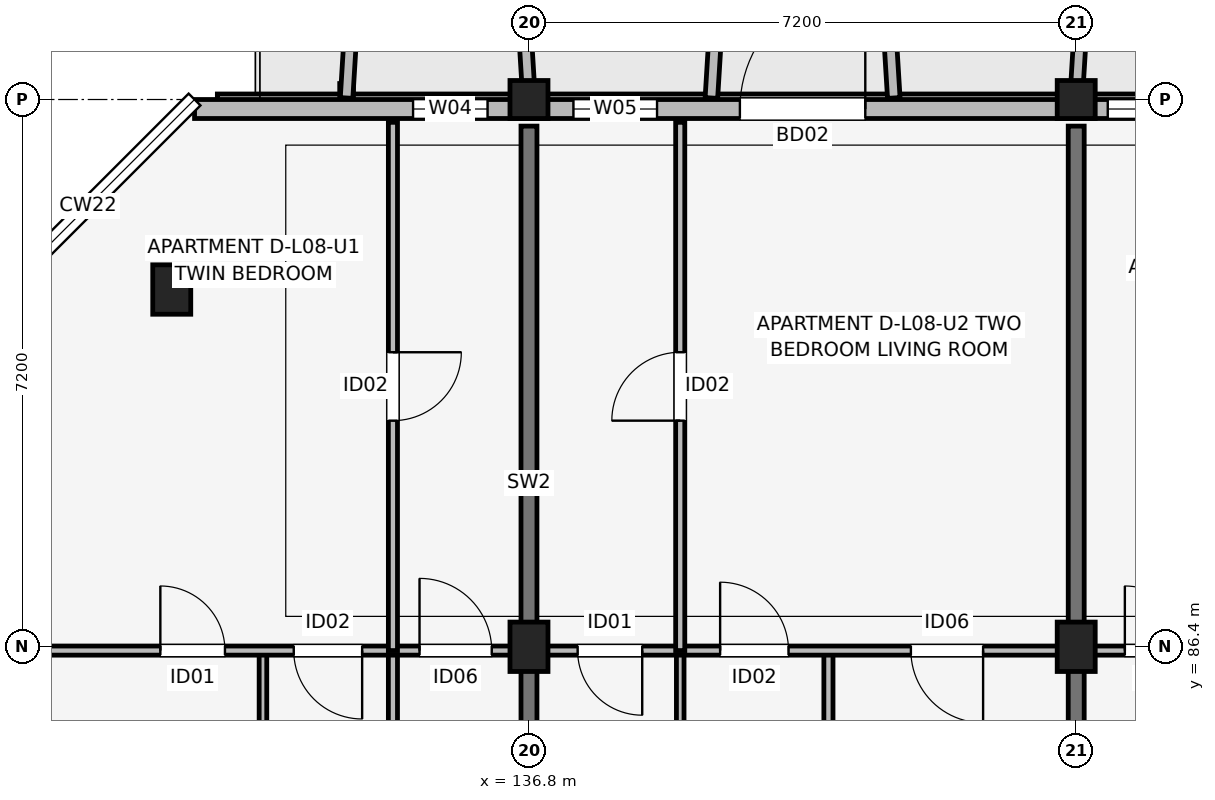
"""IFC4 building model, lengths in metres.
Left out: names, types, materials, properties, quantities, classifications, styles, units other than length and angle.
Written with IfcOpenShell. Run it as: python <this file> out.ifc"""

import sys

from ifc_helpers import new_model, si_unit, direction, frame, frame_2d, origin, origin_2d, place, context, subcontext, project, spatial, rectangle, extrude, element, fill, save


model = new_model("IFC4")
c1 = context("Model", 3, precision=1e-05, world=origin(), true_north=direction((0.0, 1.0)))
c2 = subcontext(c1, "Body", "Model", "MODEL_VIEW")
j1 = project(units=[si_unit("LENGTHUNIT", "METRE"), si_unit("PLANEANGLEUNIT", "RADIAN")], contexts=[c1])
p1 = place(None, origin())
s1 = spatial("IfcSite", under=j1, at=p1, CompositionType="ELEMENT")
p2 = place(p1, origin())
s2 = spatial("IfcBuilding", under=s1, at=p2, CompositionType="ELEMENT")
p3 = place(p2, frame((0.0, 0.0, 27.6)))
s3 = spatial("IfcBuildingStorey", under=s2, at=p3, CompositionType="ELEMENT", Elevation=27.6)
for number, where, z_axis, x_axis in (
    (1, (132.1, 91.1, 0.0), (0.0, 0.0, 1.0), (1.0, 0.0, 0.0)),
    (2, (136.8, 86.4, 0.0), (0.0, 0.0, 1.0), (1.0, 0.0, 0.0)),
):
    element("IfcColumn", number, at=place(p3, frame(where, z_axis=z_axis, x_axis=x_axis)), inside=s3, PredefinedType="COLUMN", context=c2, shape_type="SweptSolid", body=[
        extrude(rectangle(XDim=0.5, YDim=0.65, at=origin_2d()), origin(), (0.0, 0.0, 1.0), 3.15),
    ])
p4 = place(p3, frame((136.8, 93.6, 0.0), z_axis=(0.0, 0.0, 1.0), x_axis=(1.0, 0.0, 0.0)))
e3 = element("IfcColumn", 3, at=p4, inside=s3, PredefinedType="COLUMN", context=c2, shape_type="SweptSolid", body=[
    extrude(rectangle(XDim=0.5, YDim=0.5, at=origin_2d()), origin(), (0.0, 0.0, 1.0), 3.15),
])
p5 = place(p3, frame((144.0, 86.4, 0.0), z_axis=(0.0, 0.0, 1.0), x_axis=(1.0, 0.0, 0.0)))
e4 = element("IfcColumn", 4, at=p5, inside=s3, PredefinedType="COLUMN", context=c2, shape_type="SweptSolid", body=[
    extrude(rectangle(XDim=0.5, YDim=0.65, at=origin_2d()), origin(), (0.0, 0.0, 1.0), 3.15),
])
p6 = place(p3, frame((144.0, 93.6, 0.0), z_axis=(0.0, 0.0, 1.0), x_axis=(1.0, 0.0, 0.0)))
e5 = element("IfcColumn", 5, at=p6, inside=s3, PredefinedType="COLUMN", context=c2, shape_type="SweptSolid", body=[
    extrude(rectangle(XDim=0.5, YDim=0.5, at=origin_2d()), origin(), (0.0, 0.0, 1.0), 3.15),
])
for number, where, z_axis, x_axis in (
    (6, (136.8, 83.85, 0.0), (0.0, 0.0, 1.0), (0.0, 1.0, 0.0)),
    (7, (144.0, 83.85, 0.0), (0.0, 0.0, 1.0), (0.0, 1.0, 0.0)),
):
    element("IfcWall", number, at=place(p3, frame(where, z_axis=z_axis, x_axis=x_axis)), inside=s3, PredefinedType="SHEAR", context=c2, shape_type="SweptSolid", body=[
        extrude(rectangle(XDim=9.4, YDim=0.21, at=frame_2d((4.7, 0.0))), origin(), (0.0, 0.0, 1.0), 3.15),
    ])
p7 = place(p3, frame((162.8, 93.475, 0.0), z_axis=(0.0, 0.0, 1.0), x_axis=(-1.0, 0.0, 0.0)))
e8 = element("IfcWall", 8, at=p7, inside=s3, PredefinedType="SOLIDWALL", context=c2, shape_type="SweptSolid", body=[
    extrude(rectangle(XDim=30.4, YDim=0.25, at=frame_2d((15.2, 0.0))), origin(), (0.0, 0.0, 1.0), 2.43),
])
p8 = place(p7, frame((23.225, 0.0, 0.0), z_axis=(0.0, 0.0, 1.0), x_axis=(-1.0, 0.0, 0.0)))
e9 = element("IfcOpeningElement", 9, at=p8, cuts=e8, PredefinedType="OPENING", context=c2, shape_type="SweptSolid", body=[
    extrude(rectangle(XDim=1.65, YDim=2.15, at=frame_2d((0.825, 1.075))), frame((0.0, 0.135, 0.0), z_axis=(0.0, -1.0, 0.0), x_axis=(1.0, 0.0, 0.0)), (0.0, 0.0, 1.0), 0.27),
])
p9 = place(p7, frame((8.75, 0.0, 0.0), z_axis=(0.0, 0.0, 1.0), x_axis=(-1.0, 0.0, 0.0)))
e10 = element("IfcOpeningElement", 10, at=p9, cuts=e8, PredefinedType="OPENING", context=c2, shape_type="SweptSolid", body=[
    extrude(rectangle(XDim=1.5, YDim=2.15, at=frame_2d((0.75, 1.075))), frame((0.0, 0.135, 0.0), z_axis=(0.0, -1.0, 0.0), x_axis=(1.0, 0.0, 0.0)), (0.0, 0.0, 1.0), 0.27),
])
p10 = place(p7, frame((26.545, 0.0, 0.75)))
e11 = element("IfcOpeningElement", 11, at=p10, cuts=e8, PredefinedType="OPENING", context=c2, shape_type="SweptSolid", body=[
    extrude(rectangle(XDim=0.98, YDim=1.45, at=frame_2d((0.49, 0.725))), frame((0.0, 0.135, 0.0), z_axis=(0.0, -1.0, 0.0), x_axis=(1.0, 0.0, 0.0)), (0.0, 0.0, 1.0), 0.27),
])
p11 = place(p7, frame((24.315, 0.0, 0.75)))
e12 = element("IfcOpeningElement", 12, at=p11, cuts=e8, PredefinedType="OPENING", context=c2, shape_type="SweptSolid", body=[
    extrude(rectangle(XDim=1.1, YDim=1.5, at=frame_2d((0.55, 0.75))), frame((0.0, 0.135, 0.0), z_axis=(0.0, -1.0, 0.0), x_axis=(1.0, 0.0, 0.0)), (0.0, 0.0, 1.0), 0.27),
])
p12 = place(p7, frame((16.525, 0.0, 0.7)))
e13 = element("IfcOpeningElement", 13, at=p12, cuts=e8, PredefinedType="OPENING", context=c2, shape_type="SweptSolid", body=[
    extrude(rectangle(XDim=1.86, YDim=1.6, at=frame_2d((0.93, 0.8))), frame((0.0, 0.135, 0.0), z_axis=(0.0, -1.0, 0.0), x_axis=(1.0, 0.0, 0.0)), (0.0, 0.0, 1.0), 0.27),
])
p13 = place(p7, frame((12.275, 0.0, 0.75)))
e14 = element("IfcOpeningElement", 14, at=p13, cuts=e8, PredefinedType="OPENING", context=c2, shape_type="SweptSolid", body=[
    extrude(rectangle(XDim=1.34, YDim=1.55, at=frame_2d((0.67, 0.775))), frame((0.0, 0.135, 0.0), z_axis=(0.0, -1.0, 0.0), x_axis=(1.0, 0.0, 0.0)), (0.0, 0.0, 1.0), 0.27),
])
p14 = place(p7, frame((9.61, 0.0, 0.75)))
e15 = element("IfcOpeningElement", 15, at=p14, cuts=e8, PredefinedType="OPENING", context=c2, shape_type="SweptSolid", body=[
    extrude(rectangle(XDim=1.46, YDim=1.55, at=frame_2d((0.73, 0.775))), frame((0.0, 0.135, 0.0), z_axis=(0.0, -1.0, 0.0), x_axis=(1.0, 0.0, 0.0)), (0.0, 0.0, 1.0), 0.27),
])
p15 = place(p7, frame((2.935, 0.0, 0.75)))
e16 = element("IfcOpeningElement", 16, at=p15, cuts=e8, PredefinedType="OPENING", context=c2, shape_type="SweptSolid", body=[
    extrude(rectangle(XDim=0.6, YDim=1.25, at=frame_2d((0.3, 0.625))), frame((0.0, 0.135, 0.0), z_axis=(0.0, -1.0, 0.0), x_axis=(1.0, 0.0, 0.0)), (0.0, 0.0, 1.0), 0.27),
])
p16 = place(p7, frame((0.725, 0.0, 0.75)))
e17 = element("IfcOpeningElement", 17, at=p16, cuts=e8, PredefinedType="OPENING", context=c2, shape_type="SweptSolid", body=[
    extrude(rectangle(XDim=0.72, YDim=1.35, at=frame_2d((0.36, 0.675))), frame((0.0, 0.135, 0.0), z_axis=(0.0, -1.0, 0.0), x_axis=(1.0, 0.0, 0.0)), (0.0, 0.0, 1.0), 0.27),
])
for number, where, z_axis, x_axis in (
    (18, (134.4, 93.62, 0.0), (0.0, 0.0, 1.0), (0.061, 0.998, 0.0)),
    (19, (136.8, 93.62, 0.0), (0.0, 0.0, 1.0), (-0.061, 0.998, 0.0)),
):
    element("IfcWall", number, at=place(p3, frame(where, z_axis=z_axis, x_axis=x_axis)), inside=s3, PredefinedType="ELEMENTEDWALL", context=c2, shape_type="SweptSolid", body=[
        extrude(rectangle(XDim=1.964, YDim=0.165, at=frame_2d((0.982, 0.0))), origin(), (0.0, 0.0, 1.0), 2.95),
    ])
for number, where, z_axis, x_axis in (
    (20, (139.2, 93.62, 0.0), (0.0, 0.0, 1.0), (0.061, 0.998, 0.0)),
    (21, (141.6, 93.62, 0.0), (0.0, 0.0, 1.0), (-0.061, 0.998, 0.0)),
):
    element("IfcWall", number, at=place(p3, frame(where, z_axis=z_axis, x_axis=x_axis)), inside=s3, PredefinedType="ELEMENTEDWALL", context=c2, shape_type="SweptSolid", body=[
        extrude(rectangle(XDim=1.964, YDim=0.165, at=frame_2d((0.982, 0.0))), origin(), (0.0, 0.0, 1.0), 2.53),
    ])
p17 = place(p3, frame((144.0, 93.62, 0.0), z_axis=(0.0, 0.0, 1.0), x_axis=(0.061170732449, 0.998127317276, 0.0)))
e22 = element("IfcWall", 22, at=p17, inside=s3, PredefinedType="ELEMENTEDWALL", context=c2, shape_type="SweptSolid", body=[
    extrude(rectangle(XDim=1.964, YDim=0.165, at=frame_2d((0.982, 0.0))), origin(), (0.0, 0.0, 1.0), 2.95),
])
p18 = place(p3, frame((133.3, 83.7, 0.0), z_axis=(0.0, 0.0, 1.0), x_axis=(0.0, 1.0, 0.0)))
e23 = element("IfcWall", 23, at=p18, inside=s3, PredefinedType="PARTITIONING", context=c2, shape_type="SweptSolid", body=[
    extrude(rectangle(XDim=2.65, YDim=0.1, at=frame_2d((1.325, 0.0))), origin(), (0.0, 0.0, 1.0), 2.38),
])
p19 = place(p3, frame((135.01, 83.7, 0.0), z_axis=(0.0, 0.0, 1.0), x_axis=(0.0, 1.0, 0.0)))
e24 = element("IfcWall", 24, at=p19, inside=s3, PredefinedType="PARTITIONING", context=c2, shape_type="SweptSolid", body=[
    extrude(rectangle(XDim=2.65, YDim=0.12, at=frame_2d((1.325, 0.0))), origin(), (0.0, 0.0, 1.0), 2.38),
])
p20 = place(p3, frame((129.74, 86.35, 0.0), z_axis=(0.0, 0.0, 1.0), x_axis=(1.0, 0.0, 0.0)))
e25 = element("IfcWall", 25, at=p20, inside=s3, PredefinedType="PARTITIONING", context=c2, shape_type="SweptSolid", body=[
    extrude(rectangle(XDim=6.92, YDim=0.12, at=frame_2d((3.46, 0.0))), origin(), (0.0, 0.0, 1.0), 2.38),
])
p21 = place(p20, frame((2.21, 0.0, 0.0)))
e26 = element("IfcOpeningElement", 26, at=p21, cuts=e25, PredefinedType="OPENING", context=c2, shape_type="SweptSolid", body=[
    extrude(rectangle(XDim=0.85, YDim=2.08, at=frame_2d((0.425, 1.04))), frame((0.0, 0.07, 0.0), z_axis=(0.0, -1.0, 0.0), x_axis=(1.0, 0.0, 0.0)), (0.0, 0.0, 1.0), 0.14),
])
p22 = place(p20, frame((4.865, 0.0, 0.0), z_axis=(0.0, 0.0, 1.0), x_axis=(-1.0, 0.0, 0.0)))
e27 = element("IfcOpeningElement", 27, at=p22, cuts=e25, PredefinedType="OPENING", context=c2, shape_type="SweptSolid", body=[
    extrude(rectangle(XDim=0.9, YDim=2.08, at=frame_2d((0.45, 1.04))), frame((0.0, 0.07, 0.0), z_axis=(0.0, -1.0, 0.0), x_axis=(1.0, 0.0, 0.0)), (0.0, 0.0, 1.0), 0.14),
])
p23 = place(p20, frame((5.62, 0.0, 0.0)))
e28 = element("IfcOpeningElement", 28, at=p23, cuts=e25, PredefinedType="OPENING", context=c2, shape_type="SweptSolid", body=[
    extrude(rectangle(XDim=0.95, YDim=2.08, at=frame_2d((0.475, 1.04))), frame((0.0, 0.07, 0.0), z_axis=(0.0, -1.0, 0.0), x_axis=(1.0, 0.0, 0.0)), (0.0, 0.0, 1.0), 0.14),
])
p24 = place(p3, frame((135.01, 86.35, 0.0), z_axis=(0.0, 0.0, 1.0), x_axis=(0.0, 1.0, 0.0)))
e29 = element("IfcWall", 29, at=p24, inside=s3, PredefinedType="PARTITIONING", context=c2, shape_type="SweptSolid", body=[
    extrude(rectangle(XDim=6.95, YDim=0.12, at=frame_2d((3.475, 0.0))), origin(), (0.0, 0.0, 1.0), 2.38),
])
p25 = place(p24, frame((3.925, 0.0, 0.0), z_axis=(0.0, 0.0, 1.0), x_axis=(-1.0, 0.0, 0.0)))
e30 = element("IfcOpeningElement", 30, at=p25, cuts=e29, PredefinedType="OPENING", context=c2, shape_type="SweptSolid", body=[
    extrude(rectangle(XDim=0.9, YDim=2.08, at=frame_2d((0.45, 1.04))), frame((0.0, 0.07, 0.0), z_axis=(0.0, -1.0, 0.0), x_axis=(1.0, 0.0, 0.0)), (0.0, 0.0, 1.0), 0.14),
])
p26 = place(p3, frame((138.79, 83.7, 0.0), z_axis=(0.0, 0.0, 1.0), x_axis=(0.0, 1.0, 0.0)))
e31 = element("IfcWall", 31, at=p26, inside=s3, PredefinedType="PARTITIONING", context=c2, shape_type="SweptSolid", body=[
    extrude(rectangle(XDim=2.65, YDim=0.1, at=frame_2d((1.325, 0.0))), origin(), (0.0, 0.0, 1.0), 2.38),
])
p27 = place(p3, frame((140.74, 83.7, 0.0), z_axis=(0.0, 0.0, 1.0), x_axis=(0.0, 1.0, 0.0)))
e32 = element("IfcWall", 32, at=p27, inside=s3, PredefinedType="PARTITIONING", context=c2, shape_type="SweptSolid", body=[
    extrude(rectangle(XDim=2.65, YDim=0.12, at=frame_2d((1.325, 0.0))), origin(), (0.0, 0.0, 1.0), 2.38),
])
p28 = place(p3, frame((136.94, 86.35, 0.0), z_axis=(0.0, 0.0, 1.0), x_axis=(1.0, 0.0, 0.0)))
e33 = element("IfcWall", 33, at=p28, inside=s3, PredefinedType="PARTITIONING", context=c2, shape_type="SweptSolid", body=[
    extrude(rectangle(XDim=6.92, YDim=0.12, at=frame_2d((3.46, 0.0))), origin(), (0.0, 0.0, 1.0), 2.38),
])
p29 = place(p28, frame((1.35, 0.0, 0.0), z_axis=(0.0, 0.0, 1.0), x_axis=(-1.0, 0.0, 0.0)))
e34 = element("IfcOpeningElement", 34, at=p29, cuts=e33, PredefinedType="OPENING", context=c2, shape_type="SweptSolid", body=[
    extrude(rectangle(XDim=0.85, YDim=2.08, at=frame_2d((0.425, 1.04))), frame((0.0, 0.07, 0.0), z_axis=(0.0, -1.0, 0.0), x_axis=(1.0, 0.0, 0.0)), (0.0, 0.0, 1.0), 0.14),
])
p30 = place(p28, frame((2.375, 0.0, 0.0)))
e35 = element("IfcOpeningElement", 35, at=p30, cuts=e33, PredefinedType="OPENING", context=c2, shape_type="SweptSolid", body=[
    extrude(rectangle(XDim=0.9, YDim=2.08, at=frame_2d((0.45, 1.04))), frame((0.0, 0.07, 0.0), z_axis=(0.0, -1.0, 0.0), x_axis=(1.0, 0.0, 0.0)), (0.0, 0.0, 1.0), 0.14),
])
p31 = place(p28, frame((5.835, 0.0, 0.0), z_axis=(0.0, 0.0, 1.0), x_axis=(-1.0, 0.0, 0.0)))
e36 = element("IfcOpeningElement", 36, at=p31, cuts=e33, PredefinedType="OPENING", context=c2, shape_type="SweptSolid", body=[
    extrude(rectangle(XDim=0.95, YDim=2.08, at=frame_2d((0.475, 1.04))), frame((0.0, 0.07, 0.0), z_axis=(0.0, -1.0, 0.0), x_axis=(1.0, 0.0, 0.0)), (0.0, 0.0, 1.0), 0.14),
])
p32 = place(p3, frame((138.79, 86.35, 0.0), z_axis=(0.0, 0.0, 1.0), x_axis=(0.0, 1.0, 0.0)))
e37 = element("IfcWall", 37, at=p32, inside=s3, PredefinedType="PARTITIONING", context=c2, shape_type="SweptSolid", body=[
    extrude(rectangle(XDim=6.95, YDim=0.12, at=frame_2d((3.475, 0.0))), origin(), (0.0, 0.0, 1.0), 2.38),
])
p33 = place(p32, frame((3.025, 0.0, 0.0)))
e38 = element("IfcOpeningElement", 38, at=p33, cuts=e37, PredefinedType="OPENING", context=c2, shape_type="SweptSolid", body=[
    extrude(rectangle(XDim=0.9, YDim=2.08, at=frame_2d((0.45, 1.04))), frame((0.0, 0.07, 0.0), z_axis=(0.0, -1.0, 0.0), x_axis=(1.0, 0.0, 0.0)), (0.0, 0.0, 1.0), 0.14),
])
p34 = place(p3, frame((144.14, 86.35, 0.0), z_axis=(0.0, 0.0, 1.0), x_axis=(1.0, 0.0, 0.0)))
e39 = element("IfcWall", 39, at=p34, inside=s3, PredefinedType="PARTITIONING", context=c2, shape_type="SweptSolid", body=[
    extrude(rectangle(XDim=6.92, YDim=0.12, at=frame_2d((3.46, 0.0))), origin(), (0.0, 0.0, 1.0), 2.38),
])
p35 = place(p34, frame((0.5, 0.0, 0.0)))
e40 = element("IfcOpeningElement", 40, at=p35, cuts=e39, PredefinedType="OPENING", context=c2, shape_type="SweptSolid", body=[
    extrude(rectangle(XDim=0.85, YDim=2.08, at=frame_2d((0.425, 1.04))), frame((0.0, 0.07, 0.0), z_axis=(0.0, -1.0, 0.0), x_axis=(1.0, 0.0, 0.0)), (0.0, 0.0, 1.0), 0.14),
])
p36 = place(p34, frame((3.425, 0.0, 0.0), z_axis=(0.0, 0.0, 1.0), x_axis=(-1.0, 0.0, 0.0)))
e41 = element("IfcOpeningElement", 41, at=p36, cuts=e39, PredefinedType="OPENING", context=c2, shape_type="SweptSolid", body=[
    extrude(rectangle(XDim=0.9, YDim=2.08, at=frame_2d((0.45, 1.04))), frame((0.0, 0.07, 0.0), z_axis=(0.0, -1.0, 0.0), x_axis=(1.0, 0.0, 0.0)), (0.0, 0.0, 1.0), 0.14),
])
p37 = place(p34, frame((5.035, 0.0, 0.0)))
e42 = element("IfcOpeningElement", 42, at=p37, cuts=e39, PredefinedType="OPENING", context=c2, shape_type="SweptSolid", body=[
    extrude(rectangle(XDim=0.95, YDim=2.08, at=frame_2d((0.475, 1.04))), frame((0.0, 0.07, 0.0), z_axis=(0.0, -1.0, 0.0), x_axis=(1.0, 0.0, 0.0)), (0.0, 0.0, 1.0), 0.14),
])
p38 = place(p8, origin())
e43 = element("IfcDoor", 43, at=p38, inside=s3, OperationType="SINGLE_SWING_LEFT", PredefinedType="DOOR", context=c2, shape_type="SweptSolid", body=[
    extrude(rectangle(XDim=1.65, YDim=2.15, at=frame_2d((0.825, 1.075))), frame((0.0, 0.025, 0.0), z_axis=(0.0, -1.0, 0.0), x_axis=(1.0, 0.0, 0.0)), (0.0, 0.0, 1.0), 0.05),
])
fill(e9, e43)
p39 = place(p10, origin())
e44 = element("IfcWindow", 44, at=p39, inside=s3, PartitioningType="SINGLE_PANEL", PredefinedType="WINDOW", context=c2, shape_type="SweptSolid", body=[
    extrude(rectangle(XDim=0.98, YDim=1.45, at=frame_2d((0.49, 0.725))), frame((0.0, 0.03, 0.0), z_axis=(0.0, -1.0, 0.0), x_axis=(1.0, 0.0, 0.0)), (0.0, 0.0, 1.0), 0.06),
])
fill(e11, e44)
p40 = place(p11, origin())
e45 = element("IfcWindow", 45, at=p40, inside=s3, PartitioningType="SINGLE_PANEL", PredefinedType="WINDOW", context=c2, shape_type="SweptSolid", body=[
    extrude(rectangle(XDim=1.1, YDim=1.5, at=frame_2d((0.55, 0.75))), frame((0.0, 0.03, 0.0), z_axis=(0.0, -1.0, 0.0), x_axis=(1.0, 0.0, 0.0)), (0.0, 0.0, 1.0), 0.06),
])
fill(e12, e45)
p41 = place(p12, origin())
e46 = element("IfcWindow", 46, at=p41, inside=s3, PartitioningType="SINGLE_PANEL", PredefinedType="WINDOW", context=c2, shape_type="SweptSolid", body=[
    extrude(rectangle(XDim=1.86, YDim=1.6, at=frame_2d((0.93, 0.8))), frame((0.0, 0.03, 0.0), z_axis=(0.0, -1.0, 0.0), x_axis=(1.0, 0.0, 0.0)), (0.0, 0.0, 1.0), 0.06),
])
fill(e13, e46)
p42 = place(p21, origin())
e47 = element("IfcDoor", 47, at=p42, inside=s3, OperationType="SINGLE_SWING_LEFT", PredefinedType="DOOR", context=c2, shape_type="SweptSolid", body=[
    extrude(rectangle(XDim=0.85, YDim=2.08, at=frame_2d((0.425, 1.04))), frame((0.0, 0.025, 0.0), z_axis=(0.0, -1.0, 0.0), x_axis=(1.0, 0.0, 0.0)), (0.0, 0.0, 1.0), 0.05),
])
fill(e26, e47)
p43 = place(p22, origin())
e48 = element("IfcDoor", 48, at=p43, inside=s3, OperationType="SINGLE_SWING_RIGHT", PredefinedType="DOOR", context=c2, shape_type="SweptSolid", body=[
    extrude(rectangle(XDim=0.9, YDim=2.08, at=frame_2d((0.45, 1.04))), frame((0.0, 0.025, 0.0), z_axis=(0.0, -1.0, 0.0), x_axis=(1.0, 0.0, 0.0)), (0.0, 0.0, 1.0), 0.05),
])
fill(e27, e48)
p44 = place(p23, origin())
e49 = element("IfcDoor", 49, at=p44, inside=s3, OperationType="SINGLE_SWING_LEFT", PredefinedType="DOOR", context=c2, shape_type="SweptSolid", body=[
    extrude(rectangle(XDim=0.95, YDim=2.08, at=frame_2d((0.475, 1.04))), frame((0.0, 0.025, 0.0), z_axis=(0.0, -1.0, 0.0), x_axis=(1.0, 0.0, 0.0)), (0.0, 0.0, 1.0), 0.05),
])
fill(e28, e49)
p45 = place(p25, origin())
e50 = element("IfcDoor", 50, at=p45, inside=s3, OperationType="SINGLE_SWING_RIGHT", PredefinedType="DOOR", context=c2, shape_type="SweptSolid", body=[
    extrude(rectangle(XDim=0.9, YDim=2.08, at=frame_2d((0.45, 1.04))), frame((0.0, 0.025, 0.0), z_axis=(0.0, -1.0, 0.0), x_axis=(1.0, 0.0, 0.0)), (0.0, 0.0, 1.0), 0.05),
])
fill(e30, e50)
p46 = place(p29, origin())
e51 = element("IfcDoor", 51, at=p46, inside=s3, OperationType="SINGLE_SWING_RIGHT", PredefinedType="DOOR", context=c2, shape_type="SweptSolid", body=[
    extrude(rectangle(XDim=0.85, YDim=2.08, at=frame_2d((0.425, 1.04))), frame((0.0, 0.025, 0.0), z_axis=(0.0, -1.0, 0.0), x_axis=(1.0, 0.0, 0.0)), (0.0, 0.0, 1.0), 0.05),
])
fill(e34, e51)
p47 = place(p30, origin())
e52 = element("IfcDoor", 52, at=p47, inside=s3, OperationType="SINGLE_SWING_LEFT", PredefinedType="DOOR", context=c2, shape_type="SweptSolid", body=[
    extrude(rectangle(XDim=0.9, YDim=2.08, at=frame_2d((0.45, 1.04))), frame((0.0, 0.025, 0.0), z_axis=(0.0, -1.0, 0.0), x_axis=(1.0, 0.0, 0.0)), (0.0, 0.0, 1.0), 0.05),
])
fill(e35, e52)
p48 = place(p31, origin())
e53 = element("IfcDoor", 53, at=p48, inside=s3, OperationType="SINGLE_SWING_RIGHT", PredefinedType="DOOR", context=c2, shape_type="SweptSolid", body=[
    extrude(rectangle(XDim=0.95, YDim=2.08, at=frame_2d((0.475, 1.04))), frame((0.0, 0.025, 0.0), z_axis=(0.0, -1.0, 0.0), x_axis=(1.0, 0.0, 0.0)), (0.0, 0.0, 1.0), 0.05),
])
fill(e36, e53)
p49 = place(p33, origin())
e54 = element("IfcDoor", 54, at=p49, inside=s3, OperationType="SINGLE_SWING_LEFT", PredefinedType="DOOR", context=c2, shape_type="SweptSolid", body=[
    extrude(rectangle(XDim=0.9, YDim=2.08, at=frame_2d((0.45, 1.04))), frame((0.0, 0.025, 0.0), z_axis=(0.0, -1.0, 0.0), x_axis=(1.0, 0.0, 0.0)), (0.0, 0.0, 1.0), 0.05),
])
fill(e38, e54)
p50 = place(p35, origin())
e55 = element("IfcDoor", 55, at=p50, inside=s3, OperationType="SINGLE_SWING_LEFT", PredefinedType="DOOR", context=c2, shape_type="SweptSolid", body=[
    extrude(rectangle(XDim=0.85, YDim=2.08, at=frame_2d((0.425, 1.04))), frame((0.0, 0.025, 0.0), z_axis=(0.0, -1.0, 0.0), x_axis=(1.0, 0.0, 0.0)), (0.0, 0.0, 1.0), 0.05),
])
fill(e40, e55)
save(model, sys.argv[1])
